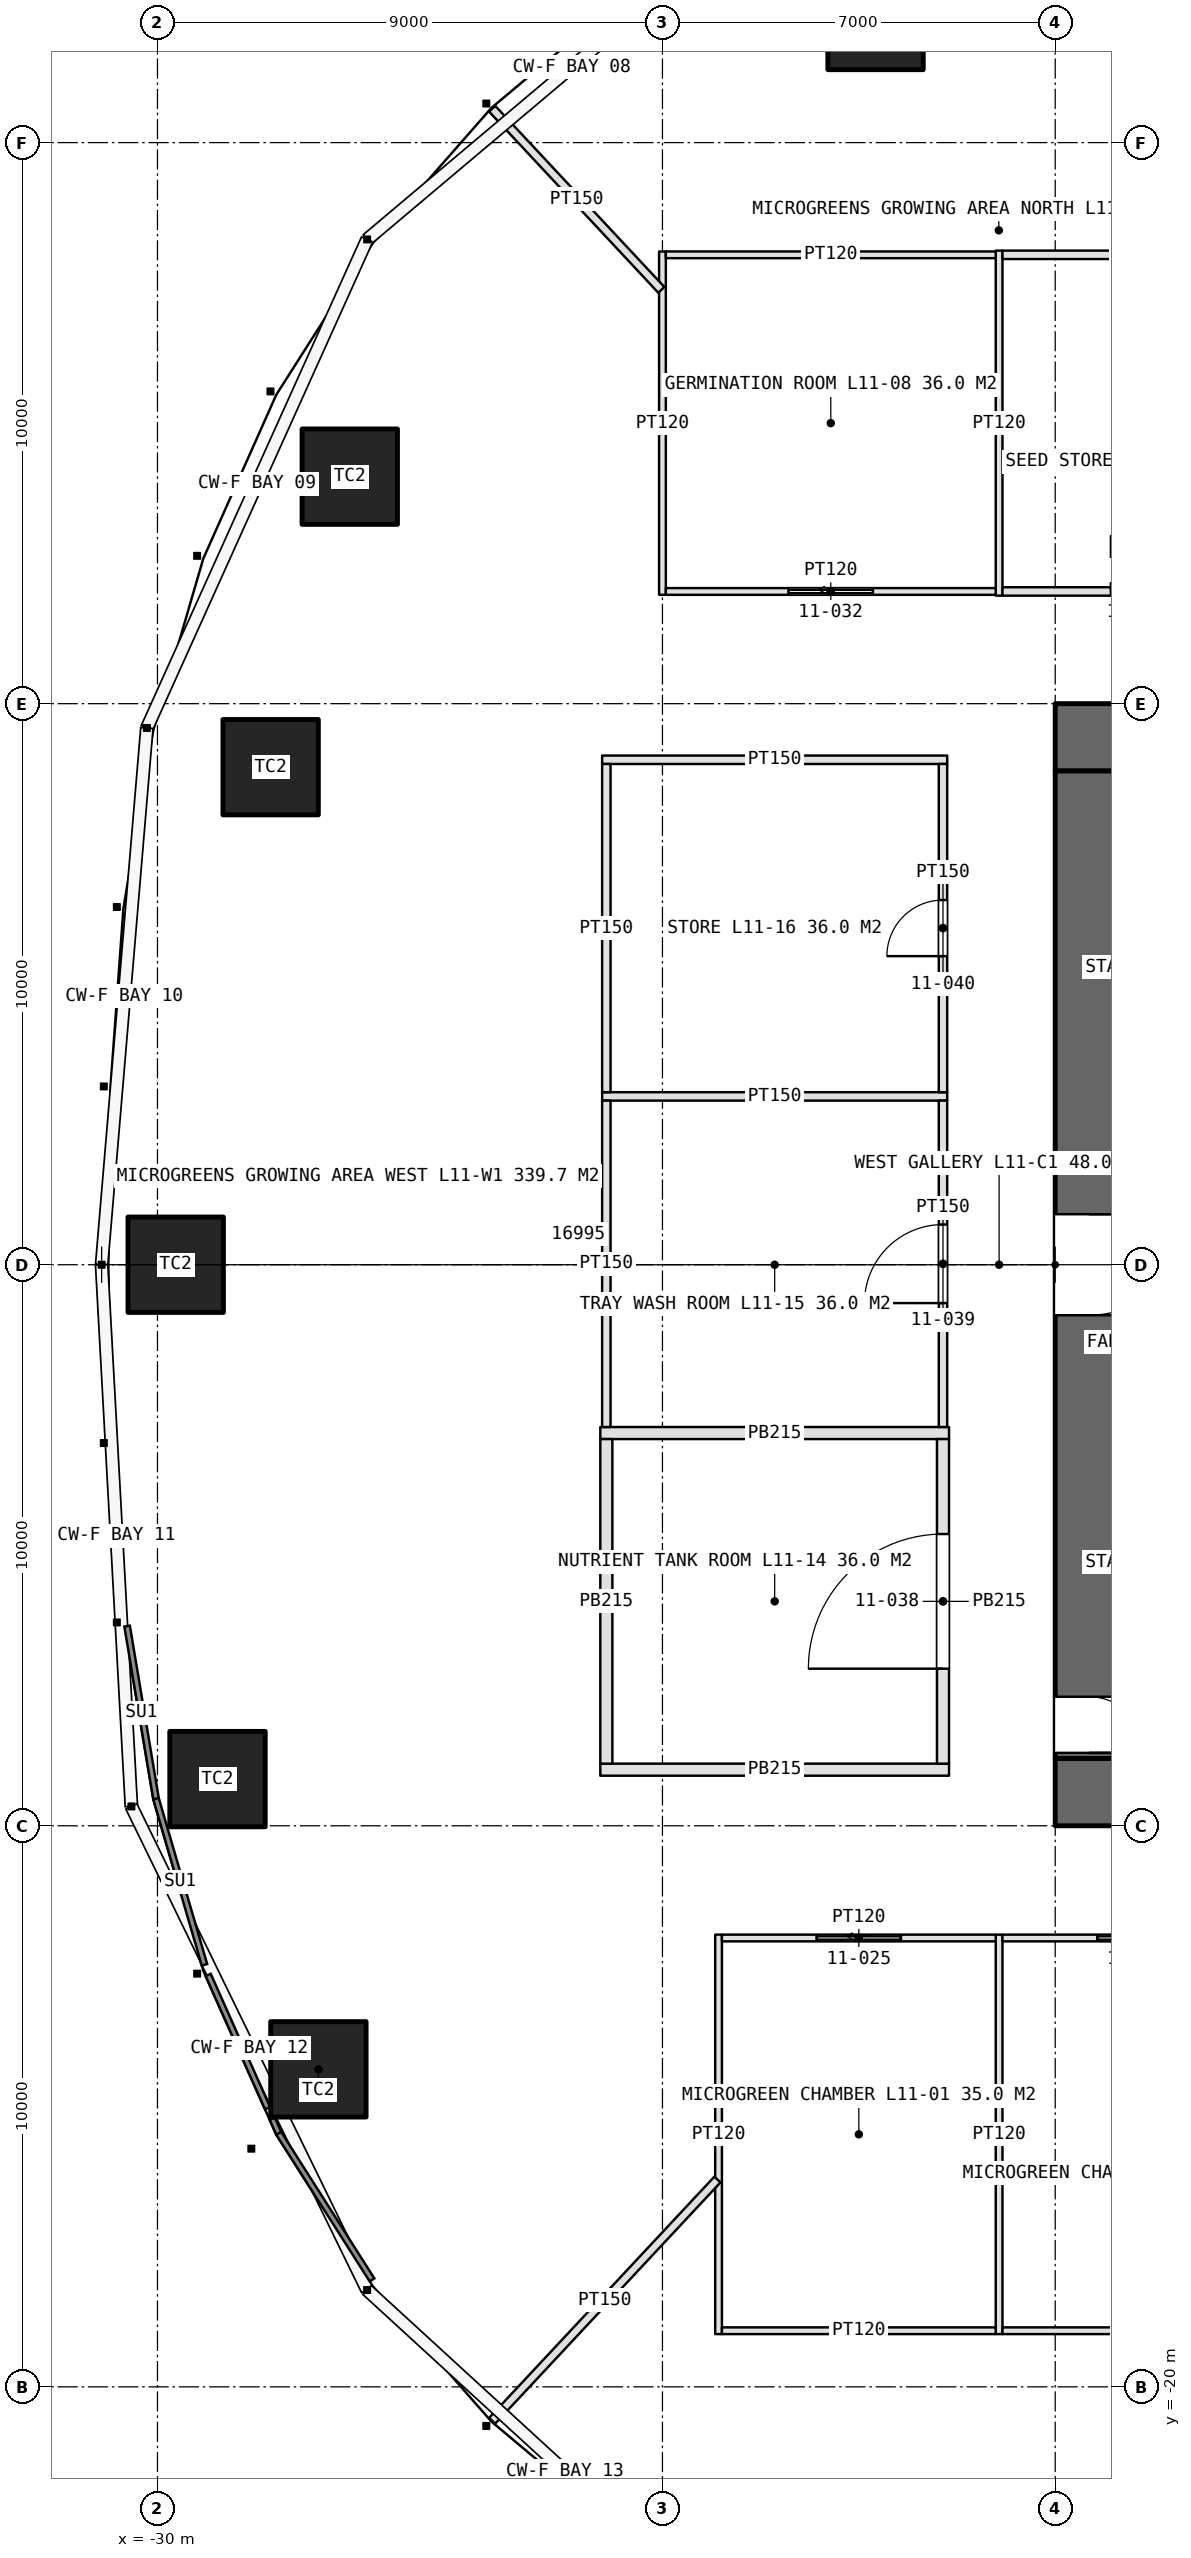
"""IFC4 building model, lengths in metres.
Left out: names, types, materials, properties, quantities, classifications, styles, units other than length and angle.
Written with IfcOpenShell. Run it as: python <this file> out.ifc"""

import sys

from ifc_helpers import new_model, si_unit, direction, frame, frame_2d, origin, origin_2d, place, context, subcontext, project, spatial, rectangle, extrude, element, fill, save


model = new_model("IFC4")
c1 = context("Model", 3, precision=1e-05, world=origin(), true_north=direction((0.0, 1.0)))
c2 = subcontext(c1, "Body", "Model", "MODEL_VIEW")
j1 = project(units=[si_unit("LENGTHUNIT", "METRE"), si_unit("PLANEANGLEUNIT", "RADIAN")], contexts=[c1])
p1 = place(None, origin())
s1 = spatial("IfcSite", under=j1, at=p1, CompositionType="ELEMENT")
p2 = place(p1, origin())
s2 = spatial("IfcBuilding", under=s1, at=p2, CompositionType="ELEMENT")
p3 = place(p2, frame((0.0, 0.0, 55.0)))
s3 = spatial("IfcBuildingStorey", under=s2, at=p3, CompositionType="ELEMENT", Elevation=55.0)
p4 = place(p3, frame((-14.0, -9.4, 0.0), z_axis=(0.0, 0.0, 1.0), x_axis=(1.0, 0.0, 0.0)))
e1 = element("IfcWall", 1, at=p4, inside=s3, PredefinedType="SHEAR", context=c2, shape_type="SweptSolid", body=[
    extrude(rectangle(XDim=28.0, YDim=1.2, at=frame_2d((14.0, 0.0))), origin(), (0.0, 0.0, 1.0), 5.0),
])
p5 = place(p4, frame((13.1, 0.0, 0.0)))
e2 = element("IfcOpeningElement", 2, at=p5, cuts=e1, PredefinedType="OPENING", context=c2, shape_type="SweptSolid", body=[
    extrude(rectangle(XDim=1.8, YDim=2.4, at=frame_2d((0.9, 1.2))), frame((0.0, 0.61, 0.0), z_axis=(0.0, -1.0, 0.0), x_axis=(1.0, 0.0, 0.0)), (0.0, 0.0, 1.0), 1.22),
])
p6 = place(p4, frame((22.9, 0.0, 0.0)))
e3 = element("IfcOpeningElement", 3, at=p6, cuts=e1, PredefinedType="OPENING", context=c2, shape_type="SweptSolid", body=[
    extrude(rectangle(XDim=2.2, YDim=2.7, at=frame_2d((1.1, 1.35))), frame((0.0, 0.61, 0.0), z_axis=(0.0, -1.0, 0.0), x_axis=(1.0, 0.0, 0.0)), (0.0, 0.0, 1.0), 1.22),
])
p7 = place(p3, frame((14.0, 9.4, 0.0), z_axis=(0.0, 0.0, 1.0), x_axis=(-1.0, 0.0, 0.0)))
e4 = element("IfcWall", 4, at=p7, inside=s3, PredefinedType="SHEAR", context=c2, shape_type="SweptSolid", body=[
    extrude(rectangle(XDim=28.0, YDim=1.2, at=frame_2d((14.0, 0.0))), origin(), (0.0, 0.0, 1.0), 5.0),
])
p8 = place(p7, frame((24.0, 0.0, 0.0)))
e5 = element("IfcOpeningElement", 5, at=p8, cuts=e4, PredefinedType="OPENING", context=c2, shape_type="SweptSolid", body=[
    extrude(rectangle(XDim=1.0, YDim=2.4, at=frame_2d((0.5, 1.2))), frame((0.0, 0.61, 0.0), z_axis=(0.0, -1.0, 0.0), x_axis=(1.0, 0.0, 0.0)), (0.0, 0.0, 1.0), 1.22),
])
p9 = place(p7, frame((13.1, 0.0, 0.0)))
e6 = element("IfcOpeningElement", 6, at=p9, cuts=e4, PredefinedType="OPENING", context=c2, shape_type="SweptSolid", body=[
    extrude(rectangle(XDim=1.8, YDim=2.4, at=frame_2d((0.9, 1.2))), frame((0.0, 0.61, 0.0), z_axis=(0.0, -1.0, 0.0), x_axis=(1.0, 0.0, 0.0)), (0.0, 0.0, 1.0), 1.22),
])
p10 = place(p3, frame((-13.4, 8.8, 0.0), z_axis=(0.0, 0.0, 1.0), x_axis=(0.0, -1.0, 0.0)))
e7 = element("IfcWall", 7, at=p10, inside=s3, PredefinedType="SHEAR", context=c2, shape_type="SweptSolid", body=[
    extrude(rectangle(XDim=17.6, YDim=1.2, at=frame_2d((8.8, 0.0))), origin(), (0.0, 0.0, 1.0), 5.0),
])
p11 = place(p10, frame((7.9, 0.0, 0.0)))
e8 = element("IfcOpeningElement", 8, at=p11, cuts=e7, PredefinedType="OPENING", context=c2, shape_type="SweptSolid", body=[
    extrude(rectangle(XDim=1.8, YDim=2.4, at=frame_2d((0.9, 1.2))), frame((0.0, 0.61, 0.0), z_axis=(0.0, -1.0, 0.0), x_axis=(1.0, 0.0, 0.0)), (0.0, 0.0, 1.0), 1.22),
])
p12 = place(p10, frame((16.5, 0.0, 0.0)))
e9 = element("IfcOpeningElement", 9, at=p12, cuts=e7, PredefinedType="OPENING", context=c2, shape_type="SweptSolid", body=[
    extrude(rectangle(XDim=1.0, YDim=2.4, at=frame_2d((0.5, 1.2))), frame((0.0, 0.61, 0.0), z_axis=(0.0, -1.0, 0.0), x_axis=(1.0, 0.0, 0.0)), (0.0, 0.0, 1.0), 1.22),
])
for number, where, z_axis, x_axis in (
    (10, (-17.202, 22.15, 0.0), (0.0, 0.0, 1.0), (1.0, 0.0, 0.0)),
    (11, (-26.573, 14.046, 0.0), (0.0, 0.0, 1.0), (1.0, 0.0, 0.0)),
    (12, (-27.983, 8.868, 0.0), (0.0, 0.0, 1.0), (1.0, 0.0, 0.0)),
    (13, (-29.675, 0.0, 0.0), (0.0, 0.0, 1.0), (1.0, 0.0, 0.0)),
    (14, (-28.93, -9.168, 0.0), (0.0, 0.0, 1.0), (1.0, 0.0, 0.0)),
    (15, (-27.132, -14.341, 0.0), (0.0, 0.0, 1.0), (1.0, 0.0, 0.0)),
):
    element("IfcColumn", number, at=place(p3, frame(where, z_axis=z_axis, x_axis=x_axis)), inside=s3, PredefinedType="COLUMN", context=c2, shape_type="SweptSolid", body=[
        extrude(rectangle(XDim=1.7, YDim=1.7, at=origin_2d()), origin(), (0.0, 0.0, 1.0), 5.0),
    ])
for number, where, z_axis, x_axis in (
    (16, (-20.0, -11.94, 0.0), (0.0, 0.0, 1.0), (0.0, -1.0, 0.0)),
    (17, (-15.0, -11.94, 0.0), (0.0, 0.0, 1.0), (0.0, -1.0, 0.0)),
):
    element("IfcWall", number, at=place(p3, frame(where, z_axis=z_axis, x_axis=x_axis)), inside=s3, PredefinedType="PARTITIONING", context=c2, shape_type="SweptSolid", body=[
        extrude(rectangle(XDim=7.12, YDim=0.12, at=frame_2d((3.56, 0.0))), origin(), (0.0, 0.0, 1.0), 3.6),
    ])
p13 = place(p3, frame((-19.94, -12.0, 0.0), z_axis=(0.0, 0.0, 1.0), x_axis=(1.0, 0.0, 0.0)))
e18 = element("IfcWall", 18, at=p13, inside=s3, PredefinedType="PARTITIONING", context=c2, shape_type="SweptSolid", body=[
    extrude(rectangle(XDim=4.88, YDim=0.12, at=frame_2d((2.44, 0.0))), origin(), (0.0, 0.0, 1.0), 3.6),
])
p14 = place(p13, frame((1.69, 0.0, 0.0)))
e19 = element("IfcOpeningElement", 19, at=p14, cuts=e18, PredefinedType="OPENING", context=c2, shape_type="SweptSolid", body=[
    extrude(rectangle(XDim=1.5, YDim=2.5, at=frame_2d((0.75, 1.25))), frame((0.0, 0.07, 0.0), z_axis=(0.0, -1.0, 0.0), x_axis=(1.0, 0.0, 0.0)), (0.0, 0.0, 1.0), 0.14),
])
p15 = place(p3, frame((-19.94, -19.0, 0.0), z_axis=(0.0, 0.0, 1.0), x_axis=(1.0, 0.0, 0.0)))
e20 = element("IfcWall", 20, at=p15, inside=s3, PredefinedType="PARTITIONING", context=c2, shape_type="SweptSolid", body=[
    extrude(rectangle(XDim=4.88, YDim=0.12, at=frame_2d((2.44, 0.0))), origin(), (0.0, 0.0, 1.0), 3.6),
])
p16 = place(p3, frame((-14.94, -12.0, 0.0), z_axis=(0.0, 0.0, 1.0), x_axis=(1.0, 0.0, 0.0)))
e21 = element("IfcWall", 21, at=p16, inside=s3, PredefinedType="PARTITIONING", context=c2, shape_type="SweptSolid", body=[
    extrude(rectangle(XDim=4.88, YDim=0.12, at=frame_2d((2.44, 0.0))), origin(), (0.0, 0.0, 1.0), 3.6),
])
p17 = place(p16, frame((1.69, 0.0, 0.0)))
e22 = element("IfcOpeningElement", 22, at=p17, cuts=e21, PredefinedType="OPENING", context=c2, shape_type="SweptSolid", body=[
    extrude(rectangle(XDim=1.5, YDim=2.5, at=frame_2d((0.75, 1.25))), frame((0.0, 0.07, 0.0), z_axis=(0.0, -1.0, 0.0), x_axis=(1.0, 0.0, 0.0)), (0.0, 0.0, 1.0), 0.14),
])
p18 = place(p3, frame((-14.94, -19.0, 0.0), z_axis=(0.0, 0.0, 1.0), x_axis=(1.0, 0.0, 0.0)))
e23 = element("IfcWall", 23, at=p18, inside=s3, PredefinedType="PARTITIONING", context=c2, shape_type="SweptSolid", body=[
    extrude(rectangle(XDim=4.88, YDim=0.12, at=frame_2d((2.44, 0.0))), origin(), (0.0, 0.0, 1.0), 3.6),
])
p19 = place(p3, frame((-21.0, 11.94, 0.0), z_axis=(0.0, 0.0, 1.0), x_axis=(0.0, 1.0, 0.0)))
e24 = element("IfcWall", 24, at=p19, inside=s3, PredefinedType="PARTITIONING", context=c2, shape_type="SweptSolid", body=[
    extrude(rectangle(XDim=6.12, YDim=0.12, at=frame_2d((3.06, 0.0))), origin(), (0.0, 0.0, 1.0), 3.6),
])
p20 = place(p3, frame((-15.0, 11.925, 0.0), z_axis=(0.0, 0.0, 1.0), x_axis=(0.0, 1.0, 0.0)))
e25 = element("IfcWall", 25, at=p20, inside=s3, PredefinedType="PARTITIONING", context=c2, shape_type="SweptSolid", body=[
    extrude(rectangle(XDim=6.15, YDim=0.12, at=frame_2d((3.075, 0.0))), origin(), (0.0, 0.0, 1.0), 3.6),
])
p21 = place(p3, frame((-20.94, 12.0, 0.0), z_axis=(0.0, 0.0, 1.0), x_axis=(1.0, 0.0, 0.0)))
e26 = element("IfcWall", 26, at=p21, inside=s3, PredefinedType="PARTITIONING", context=c2, shape_type="SweptSolid", body=[
    extrude(rectangle(XDim=5.88, YDim=0.12, at=frame_2d((2.94, 0.0))), origin(), (0.0, 0.0, 1.0), 3.6),
])
p22 = place(p21, frame((2.19, 0.0, 0.0)))
e27 = element("IfcOpeningElement", 27, at=p22, cuts=e26, PredefinedType="OPENING", context=c2, shape_type="SweptSolid", body=[
    extrude(rectangle(XDim=1.5, YDim=2.5, at=frame_2d((0.75, 1.25))), frame((0.0, 0.07, 0.0), z_axis=(0.0, -1.0, 0.0), x_axis=(1.0, 0.0, 0.0)), (0.0, 0.0, 1.0), 0.14),
])
p23 = place(p3, frame((-20.94, 18.0, 0.0), z_axis=(0.0, 0.0, 1.0), x_axis=(1.0, 0.0, 0.0)))
e28 = element("IfcWall", 28, at=p23, inside=s3, PredefinedType="PARTITIONING", context=c2, shape_type="SweptSolid", body=[
    extrude(rectangle(XDim=5.88, YDim=0.12, at=frame_2d((2.94, 0.0))), origin(), (0.0, 0.0, 1.0), 3.6),
])
p24 = place(p3, frame((-14.94, 12.0, 0.0), z_axis=(0.0, 0.0, 1.0), x_axis=(1.0, 0.0, 0.0)))
e29 = element("IfcWall", 29, at=p24, inside=s3, PredefinedType="PARTITIONING", context=c2, shape_type="SweptSolid", body=[
    extrude(rectangle(XDim=4.865, YDim=0.15, at=frame_2d((2.433, 0.0))), origin(), (0.0, 0.0, 1.0), 3.6),
])
p25 = place(p24, frame((1.933, 0.0, 0.0)))
e30 = element("IfcOpeningElement", 30, at=p25, cuts=e29, PredefinedType="OPENING", context=c2, shape_type="SweptSolid", body=[
    extrude(rectangle(XDim=1.0, YDim=2.2, at=frame_2d((0.5, 1.1))), frame((0.0, 0.085, 0.0), z_axis=(0.0, -1.0, 0.0), x_axis=(1.0, 0.0, 0.0)), (0.0, 0.0, 1.0), 0.17),
])
p26 = place(p3, frame((-14.94, 18.0, 0.0), z_axis=(0.0, 0.0, 1.0), x_axis=(1.0, 0.0, 0.0)))
e31 = element("IfcWall", 31, at=p26, inside=s3, PredefinedType="PARTITIONING", context=c2, shape_type="SweptSolid", body=[
    extrude(rectangle(XDim=4.865, YDim=0.15, at=frame_2d((2.433, 0.0))), origin(), (0.0, 0.0, 1.0), 3.6),
])
for number, where, z_axis, x_axis in (
    (32, (-15.893, -9.0, 0.0), (0.0, 0.0, 1.0), (-1.0, 0.0, 0.0)),
    (33, (-15.893, -3.0, 0.0), (0.0, 0.0, 1.0), (-1.0, 0.0, 0.0)),
):
    element("IfcWall", number, at=place(p3, frame(where, z_axis=z_axis, x_axis=x_axis)), inside=s3, PredefinedType="PARTITIONING", context=c2, shape_type="SweptSolid", body=[
        extrude(rectangle(XDim=6.215, YDim=0.215, at=frame_2d((3.107, 0.0))), origin(), (0.0, 0.0, 1.0), 3.6),
    ])
for number, where, z_axis, x_axis in (
    (34, (-15.925, 3.0, 0.0), (0.0, 0.0, 1.0), (-1.0, 0.0, 0.0)),
    (35, (-15.925, 9.0, 0.0), (0.0, 0.0, 1.0), (-1.0, 0.0, 0.0)),
):
    element("IfcWall", number, at=place(p3, frame(where, z_axis=z_axis, x_axis=x_axis)), inside=s3, PredefinedType="PARTITIONING", context=c2, shape_type="SweptSolid", body=[
        extrude(rectangle(XDim=6.15, YDim=0.15, at=frame_2d((3.075, 0.0))), origin(), (0.0, 0.0, 1.0), 3.6),
    ])
p27 = place(p3, frame((-16.0, -8.893, 0.0), z_axis=(0.0, 0.0, 1.0), x_axis=(0.0, 1.0, 0.0)))
e36 = element("IfcWall", 36, at=p27, inside=s3, PredefinedType="PARTITIONING", context=c2, shape_type="SweptSolid", body=[
    extrude(rectangle(XDim=5.785, YDim=0.215, at=frame_2d((2.893, 0.0))), origin(), (0.0, 0.0, 1.0), 3.6),
])
p28 = place(p27, frame((1.692, 0.0, 0.0)))
e37 = element("IfcOpeningElement", 37, at=p28, cuts=e36, PredefinedType="OPENING", context=c2, shape_type="SweptSolid", body=[
    extrude(rectangle(XDim=2.4, YDim=2.4, at=frame_2d((1.2, 1.2))), frame((0.0, 0.118, 0.0), z_axis=(0.0, -1.0, 0.0), x_axis=(1.0, 0.0, 0.0)), (0.0, 0.0, 1.0), 0.235),
])
p29 = place(p3, frame((-22.0, -8.893, 0.0), z_axis=(0.0, 0.0, 1.0), x_axis=(0.0, 1.0, 0.0)))
e38 = element("IfcWall", 38, at=p29, inside=s3, PredefinedType="PARTITIONING", context=c2, shape_type="SweptSolid", body=[
    extrude(rectangle(XDim=5.785, YDim=0.215, at=frame_2d((2.893, 0.0))), origin(), (0.0, 0.0, 1.0), 3.6),
])
p30 = place(p3, frame((-16.0, -2.893, 0.0), z_axis=(0.0, 0.0, 1.0), x_axis=(0.0, 1.0, 0.0)))
e39 = element("IfcWall", 39, at=p30, inside=s3, PredefinedType="PARTITIONING", context=c2, shape_type="SweptSolid", body=[
    extrude(rectangle(XDim=5.818, YDim=0.15, at=frame_2d((2.909, 0.0))), origin(), (0.0, 0.0, 1.0), 3.6),
])
p31 = place(p30, frame((2.209, 0.0, 0.0)))
e40 = element("IfcOpeningElement", 40, at=p31, cuts=e39, PredefinedType="OPENING", context=c2, shape_type="SweptSolid", body=[
    extrude(rectangle(XDim=1.4, YDim=2.4, at=frame_2d((0.7, 1.2))), frame((0.0, 0.085, 0.0), z_axis=(0.0, -1.0, 0.0), x_axis=(1.0, 0.0, 0.0)), (0.0, 0.0, 1.0), 0.17),
])
p32 = place(p3, frame((-22.0, -2.893, 0.0), z_axis=(0.0, 0.0, 1.0), x_axis=(0.0, 1.0, 0.0)))
e41 = element("IfcWall", 41, at=p32, inside=s3, PredefinedType="PARTITIONING", context=c2, shape_type="SweptSolid", body=[
    extrude(rectangle(XDim=5.818, YDim=0.15, at=frame_2d((2.909, 0.0))), origin(), (0.0, 0.0, 1.0), 3.6),
])
p33 = place(p3, frame((-16.0, 3.075, 0.0), z_axis=(0.0, 0.0, 1.0), x_axis=(0.0, 1.0, 0.0)))
e42 = element("IfcWall", 42, at=p33, inside=s3, PredefinedType="PARTITIONING", context=c2, shape_type="SweptSolid", body=[
    extrude(rectangle(XDim=5.85, YDim=0.15, at=frame_2d((2.925, 0.0))), origin(), (0.0, 0.0, 1.0), 3.6),
])
p34 = place(p33, frame((2.425, 0.0, 0.0)))
e43 = element("IfcOpeningElement", 43, at=p34, cuts=e42, PredefinedType="OPENING", context=c2, shape_type="SweptSolid", body=[
    extrude(rectangle(XDim=1.0, YDim=2.2, at=frame_2d((0.5, 1.1))), frame((0.0, 0.085, 0.0), z_axis=(0.0, -1.0, 0.0), x_axis=(1.0, 0.0, 0.0)), (0.0, 0.0, 1.0), 0.17),
])
p35 = place(p3, frame((-22.0, 3.075, 0.0), z_axis=(0.0, 0.0, 1.0), x_axis=(0.0, 1.0, 0.0)))
e44 = element("IfcWall", 44, at=p35, inside=s3, PredefinedType="PARTITIONING", context=c2, shape_type="SweptSolid", body=[
    extrude(rectangle(XDim=5.85, YDim=0.15, at=frame_2d((2.925, 0.0))), origin(), (0.0, 0.0, 1.0), 3.6),
])
p36 = place(p3, frame((-20.02, -16.305, 0.0), z_axis=(0.0, 0.0, 1.0), x_axis=(-0.682516386928, -0.730870290527, 0.0)))
e45 = element("IfcWall", 45, at=p36, inside=s3, PredefinedType="PARTITIONING", context=c2, shape_type="SweptSolid", body=[
    extrude(rectangle(XDim=5.882, YDim=0.15, at=frame_2d((2.941, 0.0))), origin(), (0.0, 0.0, 1.0), 3.6),
])
p37 = place(p3, frame((-21.02, 17.375, 0.0), z_axis=(0.0, 0.0, 1.0), x_axis=(-0.682511222631, 0.730875113123, 0.0)))
e46 = element("IfcWall", 46, at=p37, inside=s3, PredefinedType="PARTITIONING", context=c2, shape_type="SweptSolid", body=[
    extrude(rectangle(XDim=4.417, YDim=0.15, at=frame_2d((2.208, 0.0))), origin(), (0.0, 0.0, 1.0), 3.6),
])
p38 = place(p11, origin())
e47 = element("IfcDoor", 47, at=p38, inside=s3, OperationType="DOUBLE_DOOR_SINGLE_SWING", PredefinedType="DOOR", context=c2, shape_type="SweptSolid", body=[
    extrude(rectangle(XDim=1.8, YDim=2.4, at=frame_2d((0.9, 1.2))), frame((0.0, 0.025, 0.0), z_axis=(0.0, -1.0, 0.0), x_axis=(1.0, 0.0, 0.0)), (0.0, 0.0, 1.0), 0.05),
])
fill(e8, e47)
p39 = place(p12, origin())
e48 = element("IfcDoor", 48, at=p39, inside=s3, OperationType="SINGLE_SWING_RIGHT", PredefinedType="DOOR", context=c2, shape_type="SweptSolid", body=[
    extrude(rectangle(XDim=1.0, YDim=2.4, at=frame_2d((0.5, 1.2))), frame((0.0, 0.025, 0.0), z_axis=(0.0, -1.0, 0.0), x_axis=(1.0, 0.0, 0.0)), (0.0, 0.0, 1.0), 0.05),
])
fill(e9, e48)
p40 = place(p14, origin())
e49 = element("IfcDoor", 49, at=p40, inside=s3, OperationType="SLIDING_TO_LEFT", PredefinedType="DOOR", context=c2, shape_type="SweptSolid", body=[
    extrude(rectangle(XDim=1.5, YDim=2.5, at=frame_2d((0.75, 1.25))), frame((0.0, 0.025, 0.0), z_axis=(0.0, -1.0, 0.0), x_axis=(1.0, 0.0, 0.0)), (0.0, 0.0, 1.0), 0.05),
])
fill(e19, e49)
p41 = place(p17, origin())
e50 = element("IfcDoor", 50, at=p41, inside=s3, OperationType="SLIDING_TO_LEFT", PredefinedType="DOOR", context=c2, shape_type="SweptSolid", body=[
    extrude(rectangle(XDim=1.5, YDim=2.5, at=frame_2d((0.75, 1.25))), frame((0.0, 0.025, 0.0), z_axis=(0.0, -1.0, 0.0), x_axis=(1.0, 0.0, 0.0)), (0.0, 0.0, 1.0), 0.05),
])
fill(e22, e50)
p42 = place(p22, origin())
e51 = element("IfcDoor", 51, at=p42, inside=s3, OperationType="SLIDING_TO_LEFT", PredefinedType="DOOR", context=c2, shape_type="SweptSolid", body=[
    extrude(rectangle(XDim=1.5, YDim=2.5, at=frame_2d((0.75, 1.25))), frame((0.0, 0.025, 0.0), z_axis=(0.0, -1.0, 0.0), x_axis=(1.0, 0.0, 0.0)), (0.0, 0.0, 1.0), 0.05),
])
fill(e27, e51)
p43 = place(p25, origin())
e52 = element("IfcDoor", 52, at=p43, inside=s3, OperationType="SINGLE_SWING_LEFT", PredefinedType="DOOR", context=c2, shape_type="SweptSolid", body=[
    extrude(rectangle(XDim=1.0, YDim=2.2, at=frame_2d((0.5, 1.1))), frame((0.0, 0.025, 0.0), z_axis=(0.0, -1.0, 0.0), x_axis=(1.0, 0.0, 0.0)), (0.0, 0.0, 1.0), 0.05),
])
fill(e30, e52)
p44 = place(p28, origin())
e53 = element("IfcDoor", 53, at=p44, inside=s3, OperationType="DOUBLE_DOOR_SINGLE_SWING", PredefinedType="DOOR", context=c2, shape_type="SweptSolid", body=[
    extrude(rectangle(XDim=2.4, YDim=2.4, at=frame_2d((1.2, 1.2))), frame((0.0, 0.025, 0.0), z_axis=(0.0, -1.0, 0.0), x_axis=(1.0, 0.0, 0.0)), (0.0, 0.0, 1.0), 0.05),
])
fill(e37, e53)
p45 = place(p31, origin())
e54 = element("IfcDoor", 54, at=p45, inside=s3, OperationType="DOUBLE_DOOR_DOUBLE_SWING", PredefinedType="DOOR", context=c2, shape_type="SweptSolid", body=[
    extrude(rectangle(XDim=1.4, YDim=2.4, at=frame_2d((0.7, 1.2))), frame((0.0, 0.025, 0.0), z_axis=(0.0, -1.0, 0.0), x_axis=(1.0, 0.0, 0.0)), (0.0, 0.0, 1.0), 0.05),
])
fill(e40, e54)
p46 = place(p34, origin())
e55 = element("IfcDoor", 55, at=p46, inside=s3, OperationType="SINGLE_SWING_LEFT", PredefinedType="DOOR", context=c2, shape_type="SweptSolid", body=[
    extrude(rectangle(XDim=1.0, YDim=2.2, at=frame_2d((0.5, 1.1))), frame((0.0, 0.025, 0.0), z_axis=(0.0, -1.0, 0.0), x_axis=(1.0, 0.0, 0.0)), (0.0, 0.0, 1.0), 0.05),
])
fill(e43, e55)
save(model, sys.argv[1])
